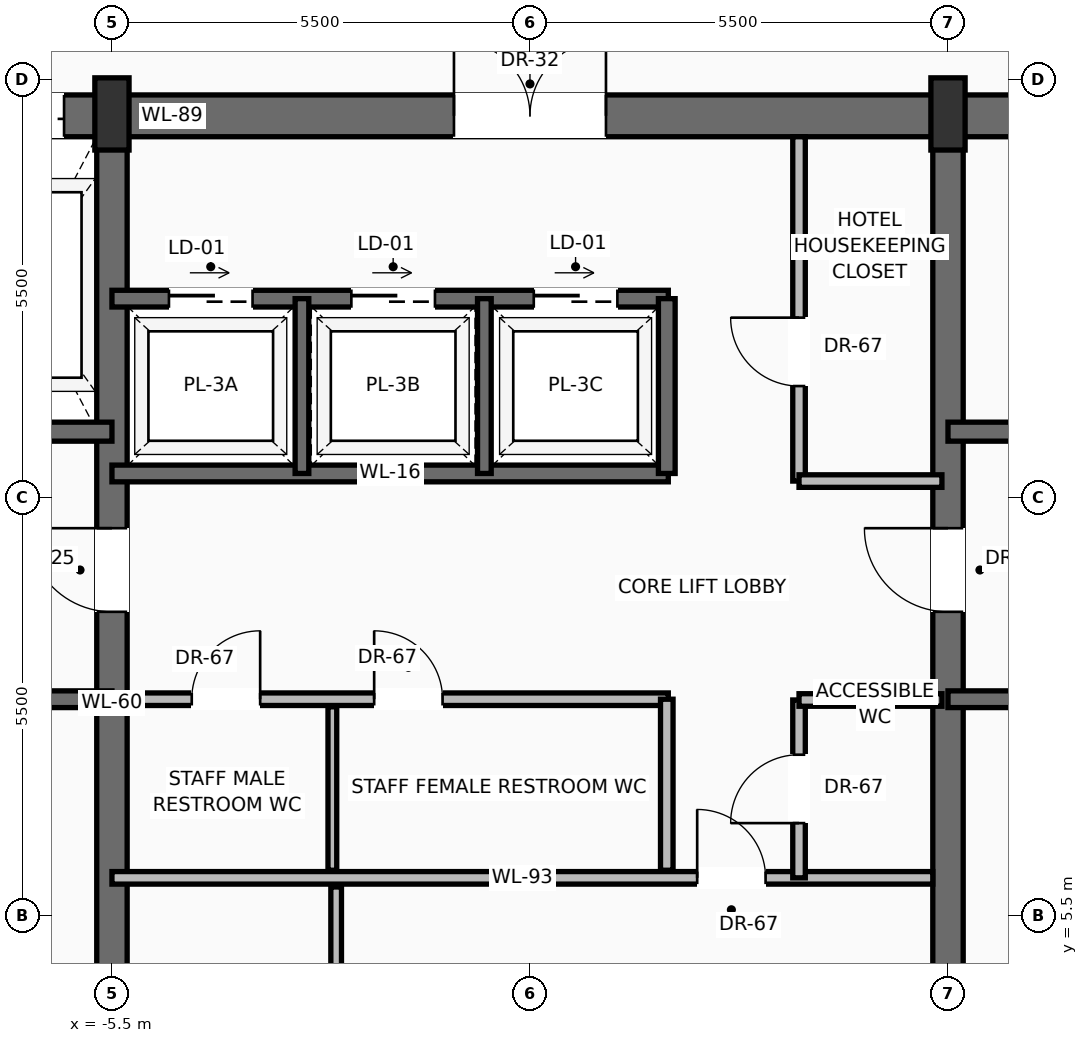
"""IFC4 building model, lengths in metres.
Left out: names, types, materials, properties, quantities, classifications, styles, units other than length and angle.
Written with IfcOpenShell. Run it as: python <this file> out.ifc"""

import sys

from ifc_helpers import new_model, si_unit, direction, frame, frame_2d, origin, origin_2d, place, context, subcontext, project, spatial, rectangle, extrude, source, transform, mapped, element, fill, save


model = new_model("IFC4")
c1 = context("Model", 3, precision=1e-05, world=origin(), true_north=direction((0.0, 1.0)))
c2 = subcontext(c1, "Body", "Model", "MODEL_VIEW")
j1 = project(units=[si_unit("LENGTHUNIT", "METRE"), si_unit("PLANEANGLEUNIT", "RADIAN")], contexts=[c1])
p1 = place(None, origin())
s1 = spatial("IfcSite", under=j1, at=p1, CompositionType="ELEMENT")
p2 = place(p1, origin())
s2 = spatial("IfcBuilding", under=s1, at=p2, CompositionType="ELEMENT")
p3 = place(p2, frame((0.0, 0.0, 247.6)))
s3 = spatial("IfcBuildingStorey", under=s2, at=p3, CompositionType="ELEMENT", Elevation=247.6)
p4 = place(p3, frame((-10.7, 16.025, 0.0), z_axis=(0.0, 0.0, 1.0), x_axis=(1.0, 0.0, 0.0)))
e1 = element("IfcWall", 1, at=p4, inside=s3, PredefinedType="SHEAR", context=c2, shape_type="SweptSolid", body=[
    extrude(rectangle(XDim=21.4, YDim=0.55, at=frame_2d((10.7, 0.0))), origin(), (0.0, 0.0, 1.0), 3.24),
])
p5 = place(p4, frame((3.27, 0.0, 0.0)))
e2 = element("IfcOpeningElement", 2, at=p5, cuts=e1, PredefinedType="OPENING", context=c2, shape_type="SweptSolid", body=[
    extrude(rectangle(XDim=1.3, YDim=2.3, at=frame_2d((0.65, 1.15))), frame((0.0, 0.285, 0.0), z_axis=(0.0, -1.0, 0.0), x_axis=(1.0, 0.0, 0.0)), (0.0, 0.0, 1.0), 0.57),
])
p6 = place(p4, frame((9.7, 0.0, 0.0)))
e3 = element("IfcOpeningElement", 3, at=p6, cuts=e1, PredefinedType="OPENING", context=c2, shape_type="SweptSolid", body=[
    extrude(rectangle(XDim=2.0, YDim=2.4, at=frame_2d((1.0, 1.2))), frame((0.0, 0.285, 0.0), z_axis=(0.0, -1.0, 0.0), x_axis=(1.0, 0.0, 0.0)), (0.0, 0.0, 1.0), 0.57),
])
p7 = place(p3, frame((-5.5, 0.575, 0.0), z_axis=(0.0, 0.0, 1.0), x_axis=(0.0, 1.0, 0.0)))
e4 = element("IfcWall", 4, at=p7, inside=s3, PredefinedType="SHEAR", context=c2, shape_type="SweptSolid", body=[
    extrude(rectangle(XDim=15.45, YDim=0.4, at=frame_2d((7.725, 0.0))), origin(), (0.0, 0.0, 1.0), 3.24),
])
p8 = place(p7, frame((8.925, 0.0, 0.0)))
e5 = element("IfcOpeningElement", 5, at=p8, cuts=e4, PredefinedType="OPENING", context=c2, shape_type="SweptSolid", body=[
    extrude(rectangle(XDim=1.1, YDim=2.2, at=frame_2d((0.55, 1.1))), frame((0.0, 0.21, 0.0), z_axis=(0.0, -1.0, 0.0), x_axis=(1.0, 0.0, 0.0)), (0.0, 0.0, 1.0), 0.42),
])
p9 = place(p3, frame((5.5, 0.575, 0.0), z_axis=(0.0, 0.0, 1.0), x_axis=(0.0, 1.0, 0.0)))
e6 = element("IfcWall", 6, at=p9, inside=s3, PredefinedType="SHEAR", context=c2, shape_type="SweptSolid", body=[
    extrude(rectangle(XDim=15.45, YDim=0.4, at=frame_2d((7.725, 0.0))), origin(), (0.0, 0.0, 1.0), 3.24),
])
p10 = place(p9, frame((8.925, 0.0, 0.0)))
e7 = element("IfcOpeningElement", 7, at=p10, cuts=e6, PredefinedType="OPENING", context=c2, shape_type="SweptSolid", body=[
    extrude(rectangle(XDim=1.1, YDim=2.2, at=frame_2d((0.55, 1.1))), frame((0.0, 0.21, 0.0), z_axis=(0.0, -1.0, 0.0), x_axis=(1.0, 0.0, 0.0)), (0.0, 0.0, 1.0), 0.42),
])
m1 = source(origin(), c2, "Body", "SweptSolid", [
    extrude(rectangle(XDim=0.45, YDim=0.95, at=origin_2d()), origin(), (0.0, 0.0, 1.0), 3.45),
])
for number, where, z_axis, x_axis in (
    (8, (-5.5, 16.05, 0.0), (0.0, 0.0, 1.0), (1.0, 0.0, 0.0)),
    (9, (5.5, 16.05, 0.0), (0.0, 0.0, 1.0), (1.0, 0.0, 0.0)),
):
    element("IfcColumn", number, at=place(p3, frame(where, z_axis=z_axis, x_axis=x_axis)), inside=s3, PredefinedType="PILASTER", context=c2, shape_type="MappedRepresentation", body=[
        mapped(m1, transform((0.0, 0.0, 0.0), scale=1.0)),
    ])
p11 = place(p3, frame((-5.5, 8.35, 0.0), z_axis=(0.0, 0.0, 1.0), x_axis=(-1.0, 0.0, 0.0)))
e10 = element("IfcWall", 10, at=p11, inside=s3, PredefinedType="SOLIDWALL", context=c2, shape_type="SweptSolid", body=[
    extrude(rectangle(XDim=4.65, YDim=0.22, at=frame_2d((2.325, 0.0))), origin(), (0.0, 0.0, 1.0), 3.24),
])
p12 = place(p11, frame((2.5, 0.0, 0.0)))
e11 = element("IfcOpeningElement", 11, at=p12, cuts=e10, PredefinedType="OPENING", context=c2, shape_type="SweptSolid", body=[
    extrude(rectangle(XDim=1.15, YDim=2.2, at=frame_2d((0.575, 1.1))), frame((0.0, 0.12, 0.0), z_axis=(0.0, -1.0, 0.0), x_axis=(1.0, 0.0, 0.0)), (0.0, 0.0, 1.0), 0.24),
])
p13 = place(p3, frame((-5.5, 11.87, 0.0), z_axis=(0.0, 0.0, 1.0), x_axis=(-1.0, 0.0, 0.0)))
e12 = element("IfcWall", 12, at=p13, inside=s3, PredefinedType="SOLIDWALL", context=c2, shape_type="SweptSolid", body=[
    extrude(rectangle(XDim=4.65, YDim=0.25, at=frame_2d((2.325, 0.0))), origin(), (0.0, 0.0, 1.0), 3.24),
])
p14 = place(p13, frame((2.95, 0.0, 0.0)))
e13 = element("IfcOpeningElement", 13, at=p14, cuts=e12, PredefinedType="OPENING", context=c2, shape_type="SweptSolid", body=[
    extrude(rectangle(XDim=1.2, YDim=2.25, at=frame_2d((0.6, 1.125))), frame((0.0, 0.135, 0.0), z_axis=(0.0, -1.0, 0.0), x_axis=(1.0, 0.0, 0.0)), (0.0, 0.0, 1.0), 0.27),
])
p15 = place(p3, frame((10.15, 8.35, 0.0), z_axis=(0.0, 0.0, 1.0), x_axis=(-1.0, 0.0, 0.0)))
e14 = element("IfcWall", 14, at=p15, inside=s3, PredefinedType="SOLIDWALL", context=c2, shape_type="SweptSolid", body=[
    extrude(rectangle(XDim=4.65, YDim=0.22, at=frame_2d((2.325, 0.0))), origin(), (0.0, 0.0, 1.0), 3.24),
])
p16 = place(p15, frame((1.0, 0.0, 0.0)))
e15 = element("IfcOpeningElement", 15, at=p16, cuts=e14, PredefinedType="OPENING", context=c2, shape_type="SweptSolid", body=[
    extrude(rectangle(XDim=1.15, YDim=2.2, at=frame_2d((0.575, 1.1))), frame((0.0, 0.12, 0.0), z_axis=(0.0, -1.0, 0.0), x_axis=(1.0, 0.0, 0.0)), (0.0, 0.0, 1.0), 0.24),
])
p17 = place(p3, frame((10.15, 11.87, 0.0), z_axis=(0.0, 0.0, 1.0), x_axis=(-1.0, 0.0, 0.0)))
e16 = element("IfcWall", 16, at=p17, inside=s3, PredefinedType="SOLIDWALL", context=c2, shape_type="SweptSolid", body=[
    extrude(rectangle(XDim=4.65, YDim=0.25, at=frame_2d((2.325, 0.0))), origin(), (0.0, 0.0, 1.0), 3.24),
])
p18 = place(p17, frame((0.5, 0.0, 0.0)))
e17 = element("IfcOpeningElement", 17, at=p18, cuts=e16, PredefinedType="OPENING", context=c2, shape_type="SweptSolid", body=[
    extrude(rectangle(XDim=1.2, YDim=2.25, at=frame_2d((0.6, 1.125))), frame((0.0, 0.135, 0.0), z_axis=(0.0, -1.0, 0.0), x_axis=(1.0, 0.0, 0.0)), (0.0, 0.0, 1.0), 0.27),
])
p19 = place(p3, frame((-5.5, 6.0, 0.0), z_axis=(0.0, 0.0, 1.0), x_axis=(1.0, 0.0, 0.0)))
e18 = element("IfcWall", 18, at=p19, inside=s3, PredefinedType="PARTITIONING", context=c2, shape_type="SweptSolid", body=[
    extrude(rectangle(XDim=10.8, YDim=0.165, at=frame_2d((5.4, 0.0))), origin(), (0.0, 0.0, 1.0), 3.232),
])
p20 = place(p19, frame((7.7, 0.0, 0.0)))
e19 = element("IfcOpeningElement", 19, at=p20, cuts=e18, PredefinedType="OPENING", context=c2, shape_type="SweptSolid", body=[
    extrude(rectangle(XDim=0.9, YDim=2.1, at=frame_2d((0.45, 1.05))), frame((0.0, 0.093, 0.0), z_axis=(0.0, -1.0, 0.0), x_axis=(1.0, 0.0, 0.0)), (0.0, 0.0, 1.0), 0.185),
])
p21 = place(p3, frame((-2.55, 0.85, 0.0), z_axis=(0.0, 0.0, 1.0), x_axis=(0.0, 1.0, 0.0)))
e20 = element("IfcWall", 20, at=p21, inside=s3, PredefinedType="PARTITIONING", context=c2, shape_type="SweptSolid", body=[
    extrude(rectangle(XDim=5.03, YDim=0.14, at=frame_2d((2.515, 0.0))), origin(), (0.0, 0.0, 1.0), 3.232),
])
p22 = place(p21, frame((2.1, 0.0, 0.0)))
e21 = element("IfcOpeningElement", 21, at=p22, cuts=e20, PredefinedType="OPENING", context=c2, shape_type="SweptSolid", body=[
    extrude(rectangle(XDim=0.9, YDim=2.1, at=frame_2d((0.45, 1.05))), frame((0.0, 0.08, 0.0), z_axis=(0.0, -1.0, 0.0), x_axis=(1.0, 0.0, 0.0)), (0.0, 0.0, 1.0), 0.16),
])
p23 = place(p3, frame((3.54, 6.0, 0.0), z_axis=(0.0, 0.0, 1.0), x_axis=(0.0, 1.0, 0.0)))
e22 = element("IfcWall", 22, at=p23, inside=s3, PredefinedType="PARTITIONING", context=c2, shape_type="SweptSolid", body=[
    extrude(rectangle(XDim=2.34, YDim=0.165, at=frame_2d((1.17, 0.0))), origin(), (0.0, 0.0, 1.0), 3.232),
])
p24 = place(p23, frame((0.72, 0.0, 0.0)))
e23 = element("IfcOpeningElement", 23, at=p24, cuts=e22, PredefinedType="OPENING", context=c2, shape_type="SweptSolid", body=[
    extrude(rectangle(XDim=0.9, YDim=2.1, at=frame_2d((0.45, 1.05))), frame((0.0, 0.093, 0.0), z_axis=(0.0, -1.0, 0.0), x_axis=(1.0, 0.0, 0.0)), (0.0, 0.0, 1.0), 0.185),
])
p25 = place(p3, frame((3.54, 8.34, 0.0), z_axis=(0.0, 0.0, 1.0), x_axis=(1.0, 0.0, 0.0)))
e24 = element("IfcWall", 24, at=p25, inside=s3, PredefinedType="PARTITIONING", context=c2, shape_type="SweptSolid", body=[
    extrude(rectangle(XDim=1.88, YDim=0.165, at=frame_2d((0.94, 0.0))), origin(), (0.0, 0.0, 1.0), 3.232),
])
p26 = place(p3, frame((-5.3, 8.35, 0.0), z_axis=(0.0, 0.0, 1.0), x_axis=(1.0, 0.0, 0.0)))
e25 = element("IfcWall", 25, at=p26, inside=s3, PredefinedType="PARTITIONING", context=c2, shape_type="SweptSolid", body=[
    extrude(rectangle(XDim=7.12, YDim=0.165, at=frame_2d((3.56, 0.0))), origin(), (0.0, 0.0, 1.0), 3.232),
])
p27 = place(p26, frame((0.85, 0.0, 0.0)))
e26 = element("IfcOpeningElement", 26, at=p27, cuts=e25, PredefinedType="OPENING", context=c2, shape_type="SweptSolid", body=[
    extrude(rectangle(XDim=0.9, YDim=2.1, at=frame_2d((0.45, 1.05))), frame((0.0, 0.093, 0.0), z_axis=(0.0, -1.0, 0.0), x_axis=(1.0, 0.0, 0.0)), (0.0, 0.0, 1.0), 0.185),
])
p28 = place(p26, frame((3.25, 0.0, 0.0)))
e27 = element("IfcOpeningElement", 27, at=p28, cuts=e25, PredefinedType="OPENING", context=c2, shape_type="SweptSolid", body=[
    extrude(rectangle(XDim=0.9, YDim=2.1, at=frame_2d((0.45, 1.05))), frame((0.0, 0.093, 0.0), z_axis=(0.0, -1.0, 0.0), x_axis=(1.0, 0.0, 0.0)), (0.0, 0.0, 1.0), 0.185),
])
p29 = place(p3, frame((1.8, 6.1, 0.0), z_axis=(0.0, 0.0, 1.0), x_axis=(0.0, 1.0, 0.0)))
e28 = element("IfcWall", 28, at=p29, inside=s3, PredefinedType="PARTITIONING", context=c2, shape_type="SweptSolid", body=[
    extrude(rectangle(XDim=2.25, YDim=0.165, at=frame_2d((1.125, 0.0))), origin(), (0.0, 0.0, 1.0), 3.232),
])
p30 = place(p3, frame((-2.6, 6.1, 0.0), z_axis=(0.0, 0.0, 1.0), x_axis=(0.0, 1.0, 0.0)))
e29 = element("IfcWall", 29, at=p30, inside=s3, PredefinedType="PARTITIONING", context=c2, shape_type="SweptSolid", body=[
    extrude(rectangle(XDim=2.15, YDim=0.115, at=frame_2d((1.075, 0.0))), origin(), (0.0, 0.0, 1.0), 3.232),
])
p31 = place(p3, frame((-5.5, 11.32, 0.0), z_axis=(0.0, 0.0, 1.0), x_axis=(1.0, 0.0, 0.0)))
e30 = element("IfcWall", 30, at=p31, inside=s3, PredefinedType="SOLIDWALL", context=c2, shape_type="SweptSolid", body=[
    extrude(rectangle(XDim=7.32, YDim=0.22, at=frame_2d((3.66, 0.0))), origin(), (0.0, 0.0, 1.0), 3.24),
])
p32 = place(p3, frame((-5.5, 13.62, 0.0), z_axis=(0.0, 0.0, 1.0), x_axis=(1.0, 0.0, 0.0)))
e31 = element("IfcWall", 31, at=p32, inside=s3, PredefinedType="SOLIDWALL", context=c2, shape_type="SweptSolid", body=[
    extrude(rectangle(XDim=7.32, YDim=0.22, at=frame_2d((3.66, 0.0))), origin(), (0.0, 0.0, 1.0), 3.24),
])
p33 = place(p32, frame((0.75, 0.0, 0.0)))
e32 = element("IfcOpeningElement", 32, at=p33, cuts=e31, PredefinedType="OPENING", context=c2, shape_type="SweptSolid", body=[
    extrude(rectangle(XDim=1.1, YDim=2.2, at=frame_2d((0.55, 1.1))), frame((0.0, 0.12, 0.0), z_axis=(0.0, -1.0, 0.0), x_axis=(1.0, 0.0, 0.0)), (0.0, 0.0, 1.0), 0.24),
])
p34 = place(p32, frame((3.15, 0.0, 0.0)))
e33 = element("IfcOpeningElement", 33, at=p34, cuts=e31, PredefinedType="OPENING", context=c2, shape_type="SweptSolid", body=[
    extrude(rectangle(XDim=1.1, YDim=2.2, at=frame_2d((0.55, 1.1))), frame((0.0, 0.12, 0.0), z_axis=(0.0, -1.0, 0.0), x_axis=(1.0, 0.0, 0.0)), (0.0, 0.0, 1.0), 0.24),
])
p35 = place(p32, frame((5.55, 0.0, 0.0)))
e34 = element("IfcOpeningElement", 34, at=p35, cuts=e31, PredefinedType="OPENING", context=c2, shape_type="SweptSolid", body=[
    extrude(rectangle(XDim=1.1, YDim=2.2, at=frame_2d((0.55, 1.1))), frame((0.0, 0.12, 0.0), z_axis=(0.0, -1.0, 0.0), x_axis=(1.0, 0.0, 0.0)), (0.0, 0.0, 1.0), 0.24),
])
p36 = place(p3, frame((1.8, 11.32, 0.0), z_axis=(0.0, 0.0, 1.0), x_axis=(0.0, 1.0, 0.0)))
e35 = element("IfcWall", 35, at=p36, inside=s3, PredefinedType="SOLIDWALL", context=c2, shape_type="SweptSolid", body=[
    extrude(rectangle(XDim=2.3, YDim=0.22, at=frame_2d((1.15, 0.0))), origin(), (0.0, 0.0, 1.0), 3.24),
])
for number, where, z_axis, x_axis in (
    (36, (-3.0, 11.32, 0.0), (0.0, 0.0, 1.0), (0.0, 1.0, 0.0)),
    (37, (-0.6, 11.32, 0.0), (0.0, 0.0, 1.0), (0.0, 1.0, 0.0)),
):
    element("IfcWall", number, at=place(p3, frame(where, z_axis=z_axis, x_axis=x_axis)), inside=s3, PredefinedType="SOLIDWALL", context=c2, shape_type="SweptSolid", body=[
        extrude(rectangle(XDim=2.3, YDim=0.18, at=frame_2d((1.15, 0.0))), origin(), (0.0, 0.0, 1.0), 3.24),
    ])
p37 = place(p3, frame((3.54, 11.22, 0.0), z_axis=(0.0, 0.0, 1.0), x_axis=(0.0, 1.0, 0.0)))
e38 = element("IfcWall", 38, at=p37, inside=s3, PredefinedType="PARTITIONING", context=c2, shape_type="SweptSolid", body=[
    extrude(rectangle(XDim=4.53, YDim=0.165, at=frame_2d((2.265, 0.0))), origin(), (0.0, 0.0, 1.0), 3.232),
])
p38 = place(p37, frame((1.25, 0.0, 0.0)))
e39 = element("IfcOpeningElement", 39, at=p38, cuts=e38, PredefinedType="OPENING", context=c2, shape_type="SweptSolid", body=[
    extrude(rectangle(XDim=0.9, YDim=2.1, at=frame_2d((0.45, 1.05))), frame((0.0, 0.093, 0.0), z_axis=(0.0, -1.0, 0.0), x_axis=(1.0, 0.0, 0.0)), (0.0, 0.0, 1.0), 0.185),
])
p39 = place(p3, frame((3.54, 11.22, 0.0), z_axis=(0.0, 0.0, 1.0), x_axis=(1.0, 0.0, 0.0)))
e40 = element("IfcWall", 40, at=p39, inside=s3, PredefinedType="PARTITIONING", context=c2, shape_type="SweptSolid", body=[
    extrude(rectangle(XDim=1.88, YDim=0.165, at=frame_2d((0.94, 0.0))), origin(), (0.0, 0.0, 1.0), 3.232),
])
m2 = source(origin(), c2, "Body", "SweptSolid", [
    extrude(rectangle(XDim=1.1, YDim=2.2, at=frame_2d((0.55, 1.1))), frame((0.0, 0.025, 0.0), z_axis=(0.0, -1.0, 0.0), x_axis=(1.0, 0.0, 0.0)), (0.0, 0.0, 1.0), 0.05),
])
p40 = place(p8, origin())
e41 = element("IfcDoor", 41, at=p40, inside=s3, OperationType="SINGLE_SWING_RIGHT", PredefinedType="DOOR", context=c2, shape_type="MappedRepresentation", body=[
    mapped(m2, transform((0.0, 0.0, 0.0), scale=1.0)),
])
fill(e5, e41)
m3 = source(origin(), c2, "Body", "SweptSolid", [
    extrude(rectangle(XDim=1.3, YDim=2.3, at=frame_2d((0.65, 1.15))), frame((0.0, 0.025, 0.0), z_axis=(0.0, -1.0, 0.0), x_axis=(1.0, 0.0, 0.0)), (0.0, 0.0, 1.0), 0.05),
])
p41 = place(p5, origin())
e42 = element("IfcDoor", 42, at=p41, inside=s3, OperationType="SLIDING_TO_RIGHT", PredefinedType="DOOR", context=c2, shape_type="MappedRepresentation", body=[
    mapped(m3, transform((0.0, 0.0, 0.0), scale=1.0)),
])
fill(e2, e42)
p42 = place(p10, origin())
e43 = element("IfcDoor", 43, at=p42, inside=s3, OperationType="SINGLE_SWING_RIGHT", PredefinedType="DOOR", context=c2, shape_type="MappedRepresentation", body=[
    mapped(m2, transform((0.0, 0.0, 0.0), scale=1.0)),
])
fill(e7, e43)
m4 = source(origin(), c2, "Body", "SweptSolid", [
    extrude(rectangle(XDim=2.0, YDim=2.4, at=frame_2d((1.0, 1.2))), frame((0.0, 0.025, 0.0), z_axis=(0.0, -1.0, 0.0), x_axis=(1.0, 0.0, 0.0)), (0.0, 0.0, 1.0), 0.05),
])
p43 = place(p6, origin())
e44 = element("IfcDoor", 44, at=p43, inside=s3, OperationType="DOUBLE_DOOR_SINGLE_SWING", PredefinedType="DOOR", context=c2, shape_type="MappedRepresentation", body=[
    mapped(m4, transform((0.0, 0.0, 0.0), scale=1.0)),
])
fill(e3, e44)
m5 = source(origin(), c2, "Body", "SweptSolid", [
    extrude(rectangle(XDim=0.9, YDim=2.1, at=frame_2d((0.45, 1.05))), frame((0.0, 0.025, 0.0), z_axis=(0.0, -1.0, 0.0), x_axis=(1.0, 0.0, 0.0)), (0.0, 0.0, 1.0), 0.05),
])
p44 = place(p20, origin())
e45 = element("IfcDoor", 45, at=p44, inside=s3, OperationType="SINGLE_SWING_LEFT", PredefinedType="DOOR", context=c2, shape_type="MappedRepresentation", body=[
    mapped(m5, transform((0.0, 0.0, 0.0), scale=1.0)),
])
fill(e19, e45)
p45 = place(p24, origin())
e46 = element("IfcDoor", 46, at=p45, inside=s3, OperationType="SINGLE_SWING_LEFT", PredefinedType="DOOR", context=c2, shape_type="MappedRepresentation", body=[
    mapped(m5, transform((0.0, 0.0, 0.0), scale=1.0)),
])
fill(e23, e46)
p46 = place(p27, origin())
e47 = element("IfcDoor", 47, at=p46, inside=s3, OperationType="SINGLE_SWING_RIGHT", PredefinedType="DOOR", context=c2, shape_type="MappedRepresentation", body=[
    mapped(m5, transform((0.0, 0.0, 0.0), scale=1.0)),
])
fill(e26, e47)
p47 = place(p28, origin())
e48 = element("IfcDoor", 48, at=p47, inside=s3, OperationType="SINGLE_SWING_LEFT", PredefinedType="DOOR", context=c2, shape_type="MappedRepresentation", body=[
    mapped(m5, transform((0.0, 0.0, 0.0), scale=1.0)),
])
fill(e27, e48)
m6 = source(origin(), c2, "Body", "SweptSolid", [
    extrude(rectangle(XDim=1.1, YDim=2.2, at=frame_2d((0.55, 1.1))), frame((0.0, 0.025, 0.0), z_axis=(0.0, -1.0, 0.0), x_axis=(1.0, 0.0, 0.0)), (0.0, 0.0, 1.0), 0.05),
])
p48 = place(p33, origin())
e49 = element("IfcDoor", 49, at=p48, inside=s3, OperationType="SLIDING_TO_RIGHT", PredefinedType="DOOR", context=c2, shape_type="MappedRepresentation", body=[
    mapped(m6, transform((0.0, 0.0, 0.0), scale=1.0)),
])
fill(e32, e49)
p49 = place(p34, origin())
e50 = element("IfcDoor", 50, at=p49, inside=s3, OperationType="SLIDING_TO_RIGHT", PredefinedType="DOOR", context=c2, shape_type="MappedRepresentation", body=[
    mapped(m6, transform((0.0, 0.0, 0.0), scale=1.0)),
])
fill(e33, e50)
p50 = place(p35, origin())
e51 = element("IfcDoor", 51, at=p50, inside=s3, OperationType="SLIDING_TO_RIGHT", PredefinedType="DOOR", context=c2, shape_type="MappedRepresentation", body=[
    mapped(m6, transform((0.0, 0.0, 0.0), scale=1.0)),
])
fill(e34, e51)
p51 = place(p38, origin())
e52 = element("IfcDoor", 52, at=p51, inside=s3, OperationType="SINGLE_SWING_RIGHT", PredefinedType="DOOR", context=c2, shape_type="MappedRepresentation", body=[
    mapped(m5, transform((0.0, 0.0, 0.0), scale=1.0)),
])
fill(e39, e52)
save(model, sys.argv[1])
